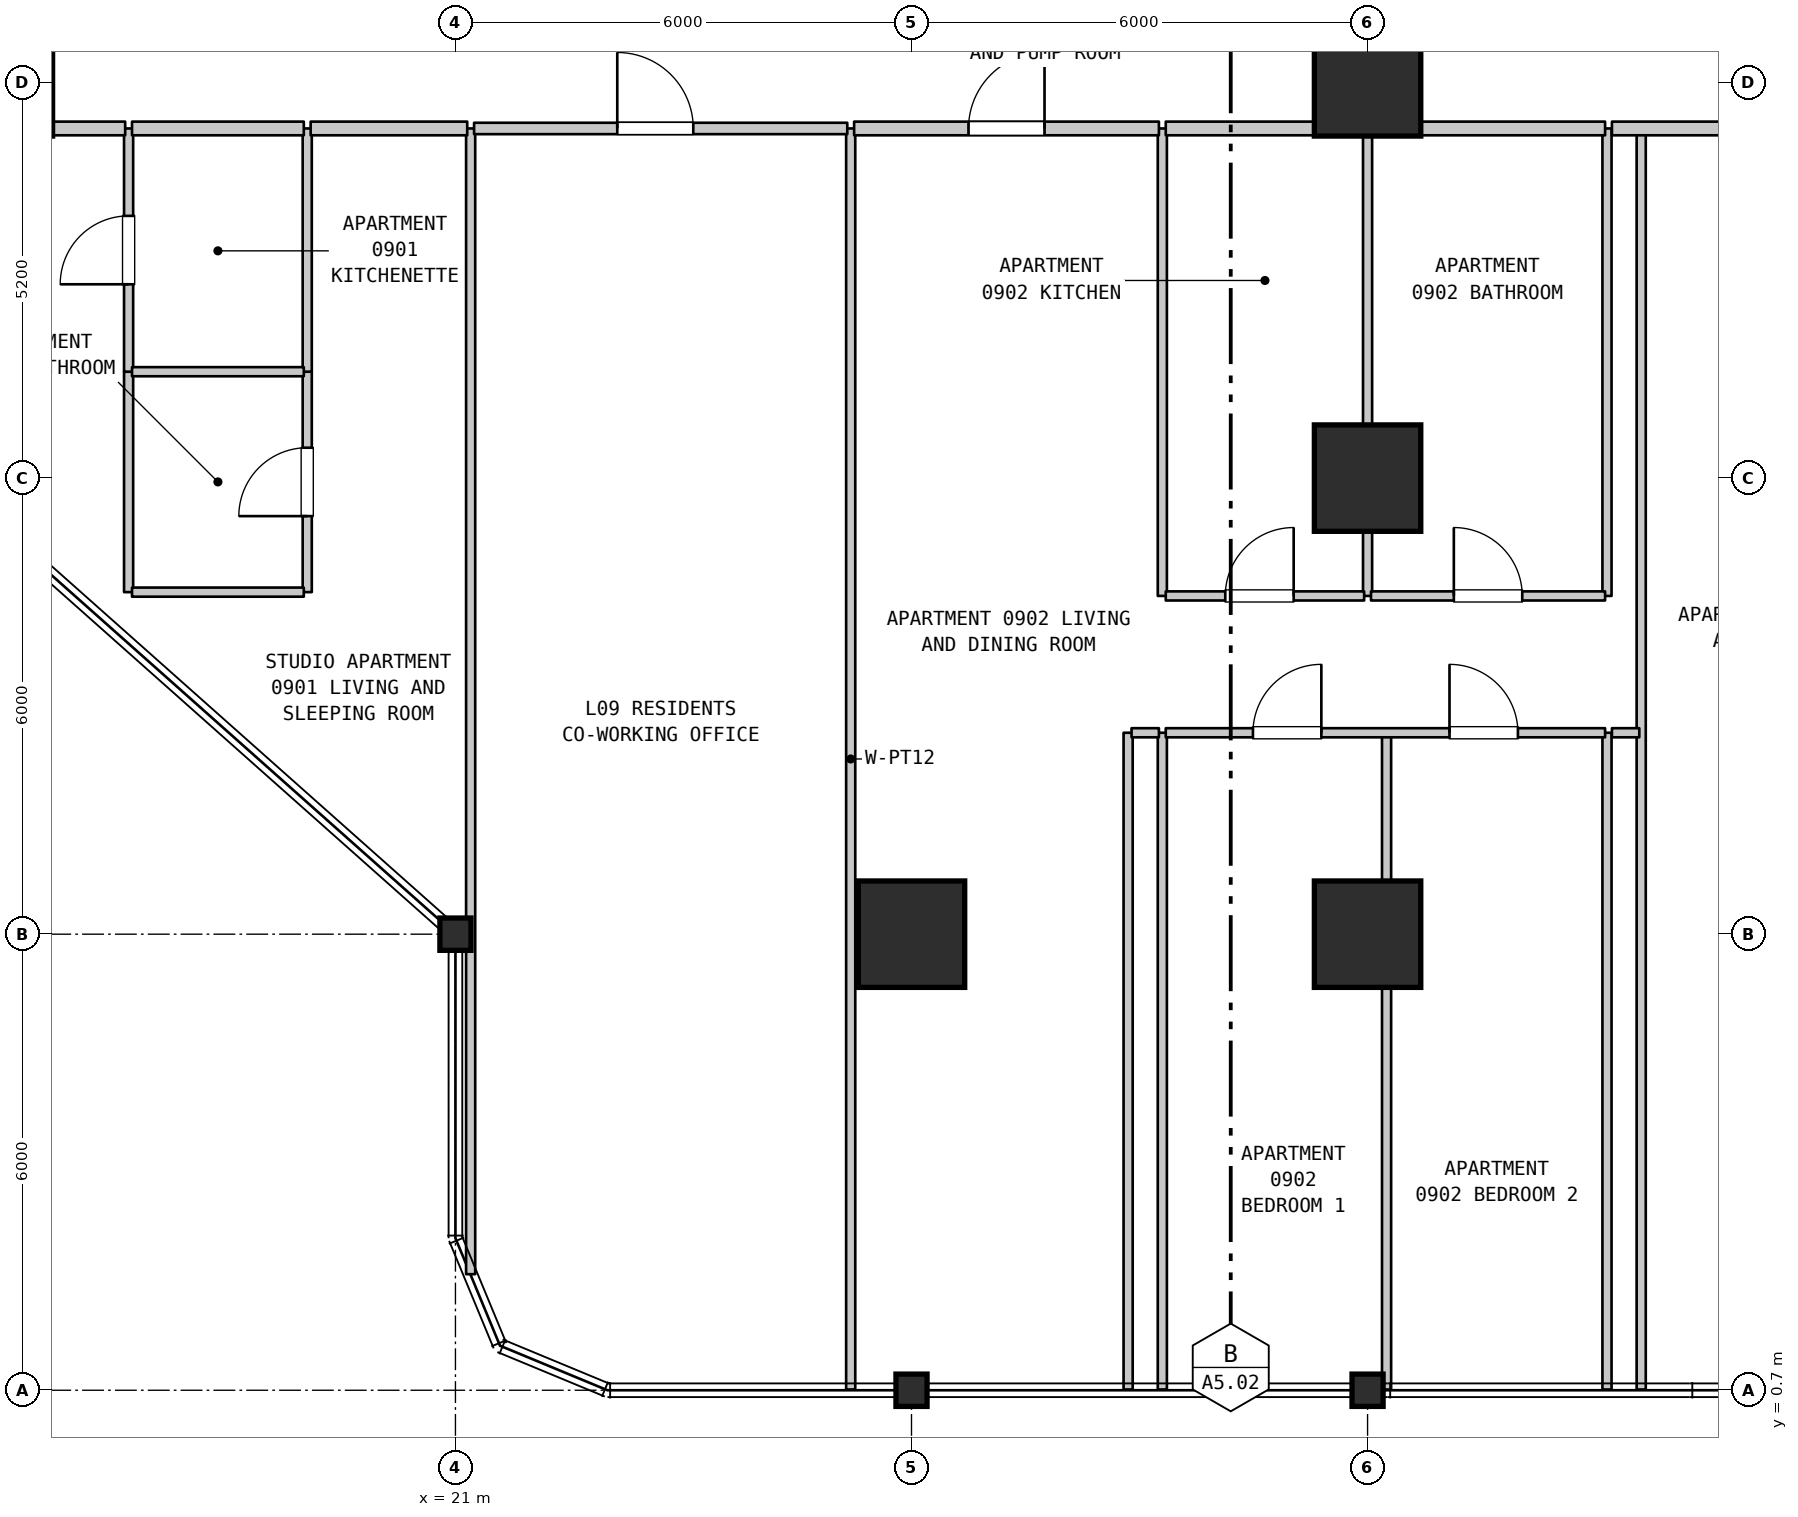
"""IFC4 building model, lengths in metres.
Left out: names, types, materials, properties, quantities, classifications, styles, units other than length and angle.
Written with IfcOpenShell. Run it as: python <this file> out.ifc"""

import sys

from ifc_helpers import new_model, si_unit, direction, frame, frame_2d, origin, origin_2d, place, context, subcontext, project, spatial, rectangle, i_section, extrude, element, fill, save


model = new_model("IFC4")
c1 = context("Model", 3, precision=1e-05, world=origin(), true_north=direction((0.0, 1.0)))
c2 = subcontext(c1, "Body", "Model", "MODEL_VIEW")
j1 = project(units=[si_unit("LENGTHUNIT", "METRE"), si_unit("PLANEANGLEUNIT", "RADIAN")], contexts=[c1])
p1 = place(None, origin())
s1 = spatial("IfcSite", under=j1, at=p1, CompositionType="ELEMENT")
p2 = place(p1, origin())
s2 = spatial("IfcBuilding", under=s1, at=p2, CompositionType="ELEMENT")
p3 = place(p2, frame((0.0, 0.0, 42.5)))
s3 = spatial("IfcBuildingStorey", under=s2, at=p3, CompositionType="ELEMENT", Elevation=42.5)
for number, where, z_axis, x_axis in (
    (1, (21.0, 6.7, 0.0), (0.0, 0.0, 1.0), (1.0, 0.0, 0.0)),
    (2, (27.0, 0.7, 0.0), (0.0, 0.0, 1.0), (1.0, 0.0, 0.0)),
):
    element("IfcColumn", number, at=place(p3, frame(where, z_axis=z_axis, x_axis=x_axis)), inside=s3, PredefinedType="COLUMN", context=c2, shape_type="SweptSolid", body=[
        extrude(i_section(OverallWidth=0.409, OverallDepth=0.425, WebThickness=0.032, FlangeThickness=0.052, FilletRadius=0.015, at=origin_2d()), origin(), (0.0, 0.0, 1.0), 3.7),
    ])
p4 = place(p3, frame((27.0, 6.7, 0.0), z_axis=(0.0, 0.0, 1.0), x_axis=(1.0, 0.0, 0.0)))
e3 = element("IfcColumn", 3, at=p4, inside=s3, PredefinedType="COLUMN", context=c2, shape_type="SweptSolid", body=[
    extrude(rectangle(XDim=1.4, YDim=1.4, at=origin_2d()), origin(), (0.0, 0.0, 1.0), 3.7),
])
p5 = place(p3, frame((33.0, 0.7, 0.0), z_axis=(0.0, 0.0, 1.0), x_axis=(1.0, 0.0, 0.0)))
e4 = element("IfcColumn", 4, at=p5, inside=s3, PredefinedType="COLUMN", context=c2, shape_type="SweptSolid", body=[
    extrude(i_section(OverallWidth=0.409, OverallDepth=0.425, WebThickness=0.032, FlangeThickness=0.052, FilletRadius=0.015, at=origin_2d()), origin(), (0.0, 0.0, 1.0), 3.7),
])
for number, where, z_axis, x_axis in (
    (5, (33.0, 6.7, 0.0), (0.0, 0.0, 1.0), (1.0, 0.0, 0.0)),
    (6, (33.0, 12.7, 0.0), (0.0, 0.0, 1.0), (1.0, 0.0, 0.0)),
    (7, (33.0, 17.9, 0.0), (0.0, 0.0, 1.0), (1.0, 0.0, 0.0)),
):
    element("IfcColumn", number, at=place(p3, frame(where, z_axis=z_axis, x_axis=x_axis)), inside=s3, PredefinedType="COLUMN", context=c2, shape_type="SweptSolid", body=[
        extrude(rectangle(XDim=1.4, YDim=1.4, at=origin_2d()), origin(), (0.0, 0.0, 1.0), 3.7),
    ])
p6 = place(p3, frame((16.7, 11.2, 0.0), z_axis=(0.0, 0.0, 1.0), x_axis=(0.0, 1.0, 0.0)))
e8 = element("IfcWall", 8, at=p6, inside=s3, PredefinedType="PARTITIONING", context=c2, shape_type="SweptSolid", body=[
    extrude(rectangle(XDim=2.9, YDim=0.12, at=frame_2d((1.45, 0.0))), origin(), (0.0, 0.0, 1.0), 3.385),
])
p7 = place(p3, frame((16.7, 14.1, 0.0), z_axis=(0.0, 0.0, 1.0), x_axis=(0.0, 1.0, 0.0)))
e9 = element("IfcWall", 9, at=p7, inside=s3, PredefinedType="PARTITIONING", context=c2, shape_type="SweptSolid", body=[
    extrude(rectangle(XDim=3.2, YDim=0.12, at=frame_2d((1.6, 0.0))), origin(), (0.0, 0.0, 1.0), 3.385),
])
p8 = place(p7, frame((1.15, 0.0, 0.0)))
e10 = element("IfcOpeningElement", 10, at=p8, cuts=e9, PredefinedType="OPENING", context=c2, shape_type="SweptSolid", body=[
    extrude(rectangle(XDim=0.9, YDim=2.15, at=frame_2d((0.45, 1.075))), frame((0.0, 0.07, 0.0), z_axis=(0.0, -1.0, 0.0), x_axis=(1.0, 0.0, 0.0)), (0.0, 0.0, 1.0), 0.14),
])
p9 = place(p3, frame((19.05, 11.2, 0.0), z_axis=(0.0, 0.0, 1.0), x_axis=(0.0, 1.0, 0.0)))
e11 = element("IfcWall", 11, at=p9, inside=s3, PredefinedType="PARTITIONING", context=c2, shape_type="SweptSolid", body=[
    extrude(rectangle(XDim=2.9, YDim=0.12, at=frame_2d((1.45, 0.0))), origin(), (0.0, 0.0, 1.0), 3.385),
])
p10 = place(p9, frame((1.0, 0.0, 0.0)))
e12 = element("IfcOpeningElement", 12, at=p10, cuts=e11, PredefinedType="OPENING", context=c2, shape_type="SweptSolid", body=[
    extrude(rectangle(XDim=0.9, YDim=2.1, at=frame_2d((0.45, 1.05))), frame((0.0, 0.07, 0.0), z_axis=(0.0, -1.0, 0.0), x_axis=(1.0, 0.0, 0.0)), (0.0, 0.0, 1.0), 0.14),
])
p11 = place(p3, frame((19.05, 14.1, 0.0), z_axis=(0.0, 0.0, 1.0), x_axis=(0.0, 1.0, 0.0)))
e13 = element("IfcWall", 13, at=p11, inside=s3, PredefinedType="PARTITIONING", context=c2, shape_type="SweptSolid", body=[
    extrude(rectangle(XDim=3.2, YDim=0.12, at=frame_2d((1.6, 0.0))), origin(), (0.0, 0.0, 1.0), 3.385),
])
p12 = place(p3, frame((21.2, 2.227, 0.0), z_axis=(0.0, 0.0, 1.0), x_axis=(0.0, 1.0, 0.0)))
e14 = element("IfcWall", 14, at=p12, inside=s3, PredefinedType="PARTITIONING", context=c2, shape_type="SweptSolid", body=[
    extrude(rectangle(XDim=15.073, YDim=0.12, at=frame_2d((7.537, 0.0))), origin(), (0.0, 0.0, 1.0), 3.385),
])
p13 = place(p3, frame((26.2, 0.71, 0.0), z_axis=(0.0, 0.0, 1.0), x_axis=(0.0, 1.0, 0.0)))
e15 = element("IfcWall", 15, at=p13, inside=s3, PredefinedType="PARTITIONING", context=c2, shape_type="SweptSolid", body=[
    extrude(rectangle(XDim=16.59, YDim=0.12, at=frame_2d((8.295, 0.0))), origin(), (0.0, 0.0, 1.0), 3.385),
])
for number, where, z_axis, x_axis in (
    (16, (29.85, 0.71, 0.0), (0.0, 0.0, 1.0), (0.0, 1.0, 0.0)),
    (17, (30.3, 0.71, 0.0), (0.0, 0.0, 1.0), (0.0, 1.0, 0.0)),
):
    element("IfcWall", number, at=place(p3, frame(where, z_axis=z_axis, x_axis=x_axis)), inside=s3, PredefinedType="PARTITIONING", context=c2, shape_type="SweptSolid", body=[
        extrude(rectangle(XDim=8.64, YDim=0.12, at=frame_2d((4.32, 0.0))), origin(), (0.0, 0.0, 1.0), 3.385),
    ])
p14 = place(p3, frame((30.3, 11.15, 0.0), z_axis=(0.0, 0.0, 1.0), x_axis=(0.0, 1.0, 0.0)))
e18 = element("IfcWall", 18, at=p14, inside=s3, PredefinedType="PARTITIONING", context=c2, shape_type="SweptSolid", body=[
    extrude(rectangle(XDim=6.15, YDim=0.12, at=frame_2d((3.075, 0.0))), origin(), (0.0, 0.0, 1.0), 3.385),
])
p15 = place(p3, frame((33.0, 11.15, 0.0), z_axis=(0.0, 0.0, 1.0), x_axis=(0.0, 1.0, 0.0)))
e19 = element("IfcWall", 19, at=p15, inside=s3, PredefinedType="PARTITIONING", context=c2, shape_type="SweptSolid", body=[
    extrude(rectangle(XDim=6.15, YDim=0.12, at=frame_2d((3.075, 0.0))), origin(), (0.0, 0.0, 1.0), 2.885),
])
for number, where, z_axis, x_axis in (
    (20, (33.25, 0.71, 0.0), (0.0, 0.0, 1.0), (0.0, 1.0, 0.0)),
    (21, (36.15, 0.71, 0.0), (0.0, 0.0, 1.0), (0.0, 1.0, 0.0)),
):
    element("IfcWall", number, at=place(p3, frame(where, z_axis=z_axis, x_axis=x_axis)), inside=s3, PredefinedType="PARTITIONING", context=c2, shape_type="SweptSolid", body=[
        extrude(rectangle(XDim=8.64, YDim=0.12, at=frame_2d((4.32, 0.0))), origin(), (0.0, 0.0, 1.0), 3.385),
    ])
p16 = place(p3, frame((36.15, 11.15, 0.0), z_axis=(0.0, 0.0, 1.0), x_axis=(0.0, 1.0, 0.0)))
e22 = element("IfcWall", 22, at=p16, inside=s3, PredefinedType="PARTITIONING", context=c2, shape_type="SweptSolid", body=[
    extrude(rectangle(XDim=6.15, YDim=0.12, at=frame_2d((3.075, 0.0))), origin(), (0.0, 0.0, 1.0), 3.385),
])
p17 = place(p3, frame((36.6, 0.71, 0.0), z_axis=(0.0, 0.0, 1.0), x_axis=(0.0, 1.0, 0.0)))
e23 = element("IfcWall", 23, at=p17, inside=s3, PredefinedType="PARTITIONING", context=c2, shape_type="SweptSolid", body=[
    extrude(rectangle(XDim=16.59, YDim=0.12, at=frame_2d((8.295, 0.0))), origin(), (0.0, 0.0, 1.0), 3.385),
])
p18 = place(p3, frame((29.895, 9.35, 0.0), z_axis=(0.0, 0.0, 1.0), x_axis=(1.0, 0.0, 0.0)))
e24 = element("IfcWall", 24, at=p18, inside=s3, PredefinedType="PARTITIONING", context=c2, shape_type="SweptSolid", body=[
    extrude(rectangle(XDim=0.36, YDim=0.12, at=frame_2d((0.18, 0.0))), origin(), (0.0, 0.0, 1.0), 3.385),
])
p19 = place(p3, frame((30.345, 9.35, 0.0), z_axis=(0.0, 0.0, 1.0), x_axis=(1.0, 0.0, 0.0)))
e25 = element("IfcWall", 25, at=p19, inside=s3, PredefinedType="PARTITIONING", context=c2, shape_type="SweptSolid", body=[
    extrude(rectangle(XDim=5.78, YDim=0.12, at=frame_2d((2.89, 0.0))), origin(), (0.0, 0.0, 1.0), 3.385),
])
p20 = place(p19, frame((1.147, 0.0, 0.0)))
e26 = element("IfcOpeningElement", 26, at=p20, cuts=e25, PredefinedType="OPENING", context=c2, shape_type="SweptSolid", body=[
    extrude(rectangle(XDim=0.9, YDim=2.15, at=frame_2d((0.45, 1.075))), frame((0.0, 0.07, 0.0), z_axis=(0.0, -1.0, 0.0), x_axis=(1.0, 0.0, 0.0)), (0.0, 0.0, 1.0), 0.14),
])
p21 = place(p19, frame((3.733, 0.0, 0.0)))
e27 = element("IfcOpeningElement", 27, at=p21, cuts=e25, PredefinedType="OPENING", context=c2, shape_type="SweptSolid", body=[
    extrude(rectangle(XDim=0.9, YDim=2.15, at=frame_2d((0.45, 1.075))), frame((0.0, 0.07, 0.0), z_axis=(0.0, -1.0, 0.0), x_axis=(1.0, 0.0, 0.0)), (0.0, 0.0, 1.0), 0.14),
])
p22 = place(p3, frame((36.215, 9.35, 0.0), z_axis=(0.0, 0.0, 1.0), x_axis=(1.0, 0.0, 0.0)))
e28 = element("IfcWall", 28, at=p22, inside=s3, PredefinedType="PARTITIONING", context=c2, shape_type="SweptSolid", body=[
    extrude(rectangle(XDim=0.36, YDim=0.12, at=frame_2d((0.18, 0.0))), origin(), (0.0, 0.0, 1.0), 3.385),
])
p23 = place(p3, frame((30.345, 11.15, 0.0), z_axis=(0.0, 0.0, 1.0), x_axis=(1.0, 0.0, 0.0)))
e29 = element("IfcWall", 29, at=p23, inside=s3, PredefinedType="PARTITIONING", context=c2, shape_type="SweptSolid", body=[
    extrude(rectangle(XDim=2.61, YDim=0.12, at=frame_2d((1.305, 0.0))), origin(), (0.0, 0.0, 1.0), 3.385),
])
p24 = place(p23, frame((0.783, 0.0, 0.0)))
e30 = element("IfcOpeningElement", 30, at=p24, cuts=e29, PredefinedType="OPENING", context=c2, shape_type="SweptSolid", body=[
    extrude(rectangle(XDim=0.9, YDim=2.15, at=frame_2d((0.45, 1.075))), frame((0.0, 0.07, 0.0), z_axis=(0.0, -1.0, 0.0), x_axis=(1.0, 0.0, 0.0)), (0.0, 0.0, 1.0), 0.14),
])
p25 = place(p3, frame((33.045, 11.15, 0.0), z_axis=(0.0, 0.0, 1.0), x_axis=(1.0, 0.0, 0.0)))
e31 = element("IfcWall", 31, at=p25, inside=s3, PredefinedType="PARTITIONING", context=c2, shape_type="SweptSolid", body=[
    extrude(rectangle(XDim=3.08, YDim=0.12, at=frame_2d((1.54, 0.0))), origin(), (0.0, 0.0, 1.0), 3.385),
])
p26 = place(p25, frame((1.09, 0.0, 0.0)))
e32 = element("IfcOpeningElement", 32, at=p26, cuts=e31, PredefinedType="OPENING", context=c2, shape_type="SweptSolid", body=[
    extrude(rectangle(XDim=0.9, YDim=2.1, at=frame_2d((0.45, 1.05))), frame((0.0, 0.07, 0.0), z_axis=(0.0, -1.0, 0.0), x_axis=(1.0, 0.0, 0.0)), (0.0, 0.0, 1.0), 0.14),
])
for number, where, z_axis, x_axis in (
    (33, (16.745, 11.2, 0.0), (0.0, 0.0, 1.0), (1.0, 0.0, 0.0)),
    (34, (16.745, 14.1, 0.0), (0.0, 0.0, 1.0), (1.0, 0.0, 0.0)),
):
    element("IfcWall", number, at=place(p3, frame(where, z_axis=z_axis, x_axis=x_axis)), inside=s3, PredefinedType="PARTITIONING", context=c2, shape_type="SweptSolid", body=[
        extrude(rectangle(XDim=2.26, YDim=0.12, at=frame_2d((1.13, 0.0))), origin(), (0.0, 0.0, 1.0), 3.385),
    ])
p27 = place(p3, frame((12.875, 17.3, 0.0), z_axis=(0.0, 0.0, 1.0), x_axis=(1.0, 0.0, 0.0)))
e35 = element("IfcWall", 35, at=p27, inside=s3, PredefinedType="STANDARD", context=c2, shape_type="SweptSolid", body=[
    extrude(rectangle(XDim=3.78, YDim=0.18, at=frame_2d((1.89, 0.0))), origin(), (0.0, 0.0, 1.0), 3.385),
])
p28 = place(p27, frame((0.317, 0.0, 0.0)))
e36 = element("IfcOpeningElement", 36, at=p28, cuts=e35, PredefinedType="OPENING", context=c2, shape_type="SweptSolid", body=[
    extrude(rectangle(XDim=1.0, YDim=2.15, at=frame_2d((0.5, 1.075))), frame((0.0, 0.1, 0.0), z_axis=(0.0, -1.0, 0.0), x_axis=(1.0, 0.0, 0.0)), (0.0, 0.0, 1.0), 0.2),
])
p29 = place(p3, frame((16.745, 17.3, 0.0), z_axis=(0.0, 0.0, 1.0), x_axis=(1.0, 0.0, 0.0)))
e37 = element("IfcWall", 37, at=p29, inside=s3, PredefinedType="STANDARD", context=c2, shape_type="SweptSolid", body=[
    extrude(rectangle(XDim=2.26, YDim=0.18, at=frame_2d((1.13, 0.0))), origin(), (0.0, 0.0, 1.0), 3.385),
])
p30 = place(p3, frame((19.095, 17.3, 0.0), z_axis=(0.0, 0.0, 1.0), x_axis=(1.0, 0.0, 0.0)))
e38 = element("IfcWall", 38, at=p30, inside=s3, PredefinedType="STANDARD", context=c2, shape_type="SweptSolid", body=[
    extrude(rectangle(XDim=2.06, YDim=0.18, at=frame_2d((1.03, 0.0))), origin(), (0.0, 0.0, 1.0), 3.385),
])
p31 = place(p3, frame((21.245, 17.3, 0.0), z_axis=(0.0, 0.0, 1.0), x_axis=(1.0, 0.0, 0.0)))
e39 = element("IfcWall", 39, at=p31, inside=s3, PredefinedType="STANDARD", context=c2, shape_type="SweptSolid", body=[
    extrude(rectangle(XDim=4.91, YDim=0.15, at=frame_2d((2.455, 0.0))), origin(), (0.0, 0.0, 1.0), 3.385),
])
p32 = place(p31, frame((1.884, 0.0, 0.0)))
e40 = element("IfcOpeningElement", 40, at=p32, cuts=e39, PredefinedType="OPENING", context=c2, shape_type="SweptSolid", body=[
    extrude(rectangle(XDim=1.0, YDim=2.15, at=frame_2d((0.5, 1.075))), frame((0.0, 0.085, 0.0), z_axis=(0.0, -1.0, 0.0), x_axis=(1.0, 0.0, 0.0)), (0.0, 0.0, 1.0), 0.17),
])
p33 = place(p3, frame((26.245, 17.3, 0.0), z_axis=(0.0, 0.0, 1.0), x_axis=(1.0, 0.0, 0.0)))
e41 = element("IfcWall", 41, at=p33, inside=s3, PredefinedType="STANDARD", context=c2, shape_type="SweptSolid", body=[
    extrude(rectangle(XDim=4.01, YDim=0.18, at=frame_2d((2.005, 0.0))), origin(), (0.0, 0.0, 1.0), 3.385),
])
p34 = place(p33, frame((1.505, 0.0, 0.0)))
e42 = element("IfcOpeningElement", 42, at=p34, cuts=e41, PredefinedType="OPENING", context=c2, shape_type="SweptSolid", body=[
    extrude(rectangle(XDim=1.0, YDim=2.15, at=frame_2d((0.5, 1.075))), frame((0.0, 0.1, 0.0), z_axis=(0.0, -1.0, 0.0), x_axis=(1.0, 0.0, 0.0)), (0.0, 0.0, 1.0), 0.2),
])
p35 = place(p3, frame((30.345, 17.3, 0.0), z_axis=(0.0, 0.0, 1.0), x_axis=(1.0, 0.0, 0.0)))
e43 = element("IfcWall", 43, at=p35, inside=s3, PredefinedType="STANDARD", context=c2, shape_type="SweptSolid", body=[
    extrude(rectangle(XDim=2.61, YDim=0.18, at=frame_2d((1.305, 0.0))), origin(), (0.0, 0.0, 1.0), 3.385),
])
p36 = place(p3, frame((33.045, 17.3, 0.0), z_axis=(0.0, 0.0, 1.0), x_axis=(1.0, 0.0, 0.0)))
e44 = element("IfcWall", 44, at=p36, inside=s3, PredefinedType="STANDARD", context=c2, shape_type="SweptSolid", body=[
    extrude(rectangle(XDim=3.08, YDim=0.18, at=frame_2d((1.54, 0.0))), origin(), (0.0, 0.0, 1.0), 3.385),
])
p37 = place(p3, frame((36.215, 17.3, 0.0), z_axis=(0.0, 0.0, 1.0), x_axis=(1.0, 0.0, 0.0)))
e45 = element("IfcWall", 45, at=p37, inside=s3, PredefinedType="STANDARD", context=c2, shape_type="SweptSolid", body=[
    extrude(rectangle(XDim=4.5, YDim=0.18, at=frame_2d((2.25, 0.0))), origin(), (0.0, 0.0, 1.0), 3.385),
])
p38 = place(p37, frame((1.879, 0.0, 0.0)))
e46 = element("IfcOpeningElement", 46, at=p38, cuts=e45, PredefinedType="OPENING", context=c2, shape_type="SweptSolid", body=[
    extrude(rectangle(XDim=1.0, YDim=2.15, at=frame_2d((0.5, 1.075))), frame((0.0, 0.1, 0.0), z_axis=(0.0, -1.0, 0.0), x_axis=(1.0, 0.0, 0.0)), (0.0, 0.0, 1.0), 0.2),
])
p39 = place(p8, origin())
e47 = element("IfcDoor", 47, at=p39, inside=s3, OperationType="SINGLE_SWING_LEFT", PredefinedType="DOOR", context=c2, shape_type="SweptSolid", body=[
    extrude(rectangle(XDim=0.9, YDim=2.15, at=frame_2d((0.45, 1.075))), frame((0.0, 0.025, 0.0), z_axis=(0.0, -1.0, 0.0), x_axis=(1.0, 0.0, 0.0)), (0.0, 0.0, 1.0), 0.05),
])
fill(e10, e47)
p40 = place(p10, origin())
e48 = element("IfcDoor", 48, at=p40, inside=s3, OperationType="SINGLE_SWING_LEFT", PredefinedType="DOOR", context=c2, shape_type="SweptSolid", body=[
    extrude(rectangle(XDim=0.9, YDim=2.1, at=frame_2d((0.45, 1.05))), frame((0.0, 0.025, 0.0), z_axis=(0.0, -1.0, 0.0), x_axis=(1.0, 0.0, 0.0)), (0.0, 0.0, 1.0), 0.05),
])
fill(e12, e48)
p41 = place(p20, origin())
e49 = element("IfcDoor", 49, at=p41, inside=s3, OperationType="SINGLE_SWING_RIGHT", PredefinedType="DOOR", context=c2, shape_type="SweptSolid", body=[
    extrude(rectangle(XDim=0.9, YDim=2.15, at=frame_2d((0.45, 1.075))), frame((0.0, 0.025, 0.0), z_axis=(0.0, -1.0, 0.0), x_axis=(1.0, 0.0, 0.0)), (0.0, 0.0, 1.0), 0.05),
])
fill(e26, e49)
p42 = place(p21, origin())
e50 = element("IfcDoor", 50, at=p42, inside=s3, OperationType="SINGLE_SWING_LEFT", PredefinedType="DOOR", context=c2, shape_type="SweptSolid", body=[
    extrude(rectangle(XDim=0.9, YDim=2.15, at=frame_2d((0.45, 1.075))), frame((0.0, 0.025, 0.0), z_axis=(0.0, -1.0, 0.0), x_axis=(1.0, 0.0, 0.0)), (0.0, 0.0, 1.0), 0.05),
])
fill(e27, e50)
p43 = place(p24, origin())
e51 = element("IfcDoor", 51, at=p43, inside=s3, OperationType="SINGLE_SWING_RIGHT", PredefinedType="DOOR", context=c2, shape_type="SweptSolid", body=[
    extrude(rectangle(XDim=0.9, YDim=2.15, at=frame_2d((0.45, 1.075))), frame((0.0, 0.025, 0.0), z_axis=(0.0, -1.0, 0.0), x_axis=(1.0, 0.0, 0.0)), (0.0, 0.0, 1.0), 0.05),
])
fill(e30, e51)
p44 = place(p26, origin())
e52 = element("IfcDoor", 52, at=p44, inside=s3, OperationType="SINGLE_SWING_LEFT", PredefinedType="DOOR", context=c2, shape_type="SweptSolid", body=[
    extrude(rectangle(XDim=0.9, YDim=2.1, at=frame_2d((0.45, 1.05))), frame((0.0, 0.025, 0.0), z_axis=(0.0, -1.0, 0.0), x_axis=(1.0, 0.0, 0.0)), (0.0, 0.0, 1.0), 0.05),
])
fill(e32, e52)
p45 = place(p32, origin())
e53 = element("IfcDoor", 53, at=p45, inside=s3, OperationType="SINGLE_SWING_LEFT", PredefinedType="DOOR", context=c2, shape_type="SweptSolid", body=[
    extrude(rectangle(XDim=1.0, YDim=2.15, at=frame_2d((0.5, 1.075))), frame((0.0, 0.025, 0.0), z_axis=(0.0, -1.0, 0.0), x_axis=(1.0, 0.0, 0.0)), (0.0, 0.0, 1.0), 0.05),
])
fill(e40, e53)
p46 = place(p34, origin())
e54 = element("IfcDoor", 54, at=p46, inside=s3, OperationType="SINGLE_SWING_RIGHT", PredefinedType="DOOR", context=c2, shape_type="SweptSolid", body=[
    extrude(rectangle(XDim=1.0, YDim=2.15, at=frame_2d((0.5, 1.075))), frame((0.0, 0.025, 0.0), z_axis=(0.0, -1.0, 0.0), x_axis=(1.0, 0.0, 0.0)), (0.0, 0.0, 1.0), 0.05),
])
fill(e42, e54)
save(model, sys.argv[1])
